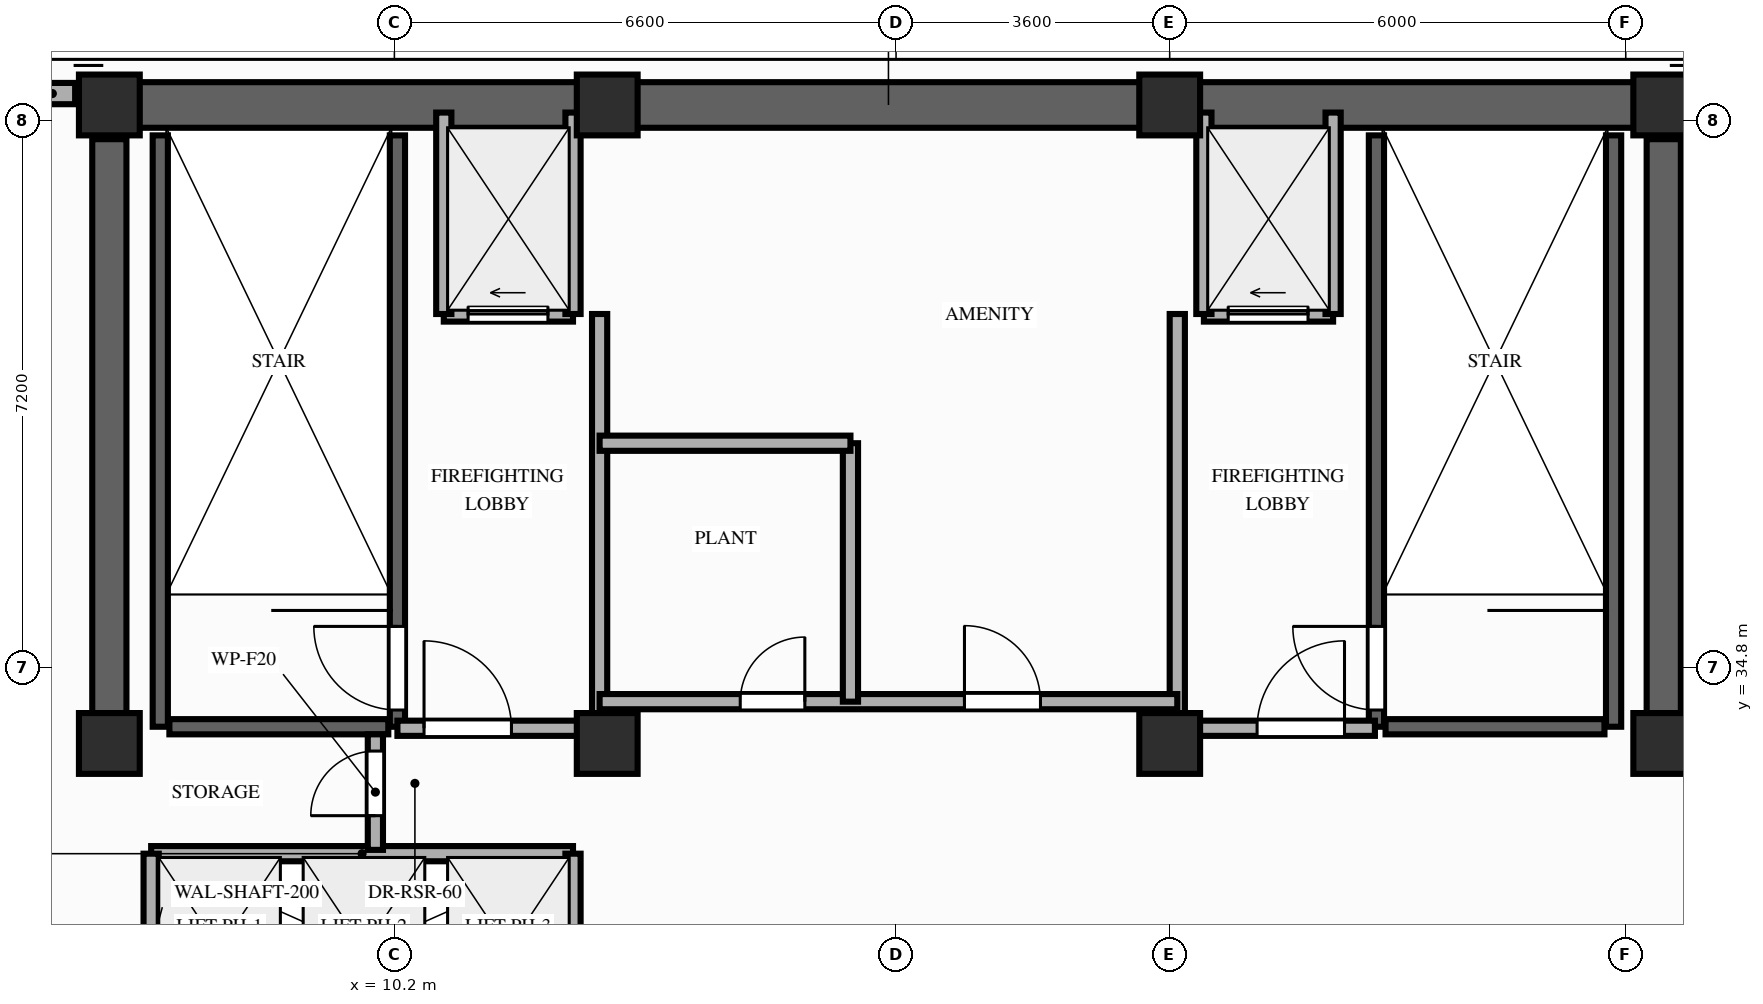
"""IFC4 building model, lengths in metres.
Left out: names, types, materials, properties, quantities, classifications, styles, units other than length and angle.
Written with IfcOpenShell. Run it as: python <this file> out.ifc"""

import sys

from ifc_helpers import new_model, si_unit, direction, frame, frame_2d, origin, origin_2d, place, context, subcontext, project, spatial, rectangle, extrude, element, fill, save


model = new_model("IFC4")
c1 = context("Model", 3, precision=1e-05, world=origin(), true_north=direction((0.0, 1.0)))
c2 = subcontext(c1, "Body", "Model", "MODEL_VIEW")
j1 = project(units=[si_unit("LENGTHUNIT", "METRE"), si_unit("PLANEANGLEUNIT", "RADIAN")], contexts=[c1])
p1 = place(None, origin())
s1 = spatial("IfcSite", under=j1, at=p1, CompositionType="ELEMENT")
p2 = place(p1, origin())
s2 = spatial("IfcBuilding", under=s1, at=p2, CompositionType="ELEMENT")
p3 = place(p2, frame((0.0, 0.0, 250.4)))
s3 = spatial("IfcBuildingStorey", under=s2, at=p3, CompositionType="ELEMENT", Elevation=250.4)
for number, where, z_axis, x_axis in (
    (1, (6.45, 33.8, 0.0), (0.0, 0.0, 1.0), (1.0, 0.0, 0.0)),
    (2, (13.0, 33.8, 0.0), (0.0, 0.0, 1.0), (1.0, 0.0, 0.0)),
    (3, (20.4, 33.8, 0.0), (0.0, 0.0, 1.0), (1.0, 0.0, 0.0)),
    (4, (26.9, 33.8, 0.0), (0.0, 0.0, 1.0), (1.0, 0.0, 0.0)),
    (5, (6.45, 42.2, 0.0), (0.0, 0.0, 1.0), (1.0, 0.0, 0.0)),
    (6, (13.0, 42.2, 0.0), (0.0, 0.0, 1.0), (1.0, 0.0, 0.0)),
    (7, (20.4, 42.2, 0.0), (0.0, 0.0, 1.0), (1.0, 0.0, 0.0)),
    (8, (26.9, 42.2, 0.0), (0.0, 0.0, 1.0), (1.0, 0.0, 0.0)),
):
    element("IfcColumn", number, at=place(p3, frame(where, z_axis=z_axis, x_axis=x_axis)), inside=s3, PredefinedType="COLUMN", context=c2, shape_type="SweptSolid", body=[
        extrude(rectangle(XDim=0.8, YDim=0.8, at=origin_2d()), origin(), (0.0, 0.0, 1.0), 3.8),
    ])
p4 = place(p3, frame((6.0, 42.35, 0.0), z_axis=(0.0, 0.0, 1.0), x_axis=(-1.0, 0.0, 0.0)))
e9 = element("IfcWall", 9, at=p4, inside=s3, PredefinedType="STANDARD", context=c2, shape_type="SweptSolid", body=[
    extrude(rectangle(XDim=0.6, YDim=0.28, at=frame_2d((0.3, 0.0))), origin(), (0.0, 0.0, 1.0), 3.58),
])
p5 = place(p3, frame((6.45, 42.2, 0.0), z_axis=(0.0, 0.0, 1.0), x_axis=(1.0, 0.0, 0.0)))
e10 = element("IfcWall", 10, at=p5, inside=s3, PredefinedType="SHEAR", context=c2, shape_type="SweptSolid", body=[
    extrude(rectangle(XDim=20.45, YDim=0.6, at=frame_2d((10.225, 0.0))), origin(), (0.0, 0.0, 1.0), 3.58),
])
for number, where, z_axis, x_axis in (
    (11, (6.45, 33.8, 0.0), (0.0, 0.0, 1.0), (0.0, 1.0, 0.0)),
    (12, (26.9, 33.8, 0.0), (0.0, 0.0, 1.0), (0.0, 1.0, 0.0)),
):
    element("IfcWall", number, at=place(p3, frame(where, z_axis=z_axis, x_axis=x_axis)), inside=s3, PredefinedType="SHEAR", context=c2, shape_type="SweptSolid", body=[
        extrude(rectangle(XDim=7.95, YDim=0.45, at=frame_2d((3.975, 0.0))), origin(), (0.0, 0.0, 1.0), 3.58),
    ])
p6 = place(p3, frame((7.12, 34.02, 0.0), z_axis=(0.0, 0.0, 1.0), x_axis=(0.0, 1.0, 0.0)))
e13 = element("IfcWall", 13, at=p6, inside=s3, PredefinedType="SHEAR", context=c2, shape_type="SweptSolid", body=[
    extrude(rectangle(XDim=7.78, YDim=0.2, at=frame_2d((3.89, 0.0))), origin(), (0.0, 0.0, 1.0), 3.58),
])
p7 = place(p3, frame((10.24, 34.02, 0.0), z_axis=(0.0, 0.0, 1.0), x_axis=(0.0, 1.0, 0.0)))
e14 = element("IfcWall", 14, at=p7, inside=s3, PredefinedType="SHEAR", context=c2, shape_type="SweptSolid", body=[
    extrude(rectangle(XDim=7.78, YDim=0.2, at=frame_2d((3.89, 0.0))), origin(), (0.0, 0.0, 1.0), 3.58),
])
p8 = place(p7, frame((0.22, 0.0, 0.0)))
e15 = element("IfcOpeningElement", 15, at=p8, cuts=e14, PredefinedType="OPENING", context=c2, shape_type="SweptSolid", body=[
    extrude(rectangle(XDim=1.1, YDim=2.15, at=frame_2d((0.55, 1.075))), frame((0.0, 0.11, 0.0), z_axis=(0.0, -1.0, 0.0), x_axis=(1.0, 0.0, 0.0)), (0.0, 0.0, 1.0), 0.22),
])
p9 = place(p3, frame((7.24, 34.02, 0.0), z_axis=(0.0, 0.0, 1.0), x_axis=(1.0, 0.0, 0.0)))
e16 = element("IfcWall", 16, at=p9, inside=s3, PredefinedType="SHEAR", context=c2, shape_type="SweptSolid", body=[
    extrude(rectangle(XDim=2.88, YDim=0.2, at=frame_2d((1.44, 0.0))), origin(), (0.0, 0.0, 1.0), 3.58),
])
p10 = place(p3, frame((23.12, 34.02, 0.0), z_axis=(0.0, 0.0, 1.0), x_axis=(0.0, 1.0, 0.0)))
e17 = element("IfcWall", 17, at=p10, inside=s3, PredefinedType="SHEAR", context=c2, shape_type="SweptSolid", body=[
    extrude(rectangle(XDim=7.78, YDim=0.2, at=frame_2d((3.89, 0.0))), origin(), (0.0, 0.0, 1.0), 3.58),
])
p11 = place(p10, frame((0.22, 0.0, 0.0)))
e18 = element("IfcOpeningElement", 18, at=p11, cuts=e17, PredefinedType="OPENING", context=c2, shape_type="SweptSolid", body=[
    extrude(rectangle(XDim=1.1, YDim=2.15, at=frame_2d((0.55, 1.075))), frame((0.0, 0.11, 0.0), z_axis=(0.0, -1.0, 0.0), x_axis=(1.0, 0.0, 0.0)), (0.0, 0.0, 1.0), 0.22),
])
p12 = place(p3, frame((26.24, 34.02, 0.0), z_axis=(0.0, 0.0, 1.0), x_axis=(0.0, 1.0, 0.0)))
e19 = element("IfcWall", 19, at=p12, inside=s3, PredefinedType="SHEAR", context=c2, shape_type="SweptSolid", body=[
    extrude(rectangle(XDim=7.78, YDim=0.2, at=frame_2d((3.89, 0.0))), origin(), (0.0, 0.0, 1.0), 3.58),
])
p13 = place(p3, frame((23.24, 34.02, 0.0), z_axis=(0.0, 0.0, 1.0), x_axis=(1.0, 0.0, 0.0)))
e20 = element("IfcWall", 20, at=p13, inside=s3, PredefinedType="SHEAR", context=c2, shape_type="SweptSolid", body=[
    extrude(rectangle(XDim=2.88, YDim=0.2, at=frame_2d((1.44, 0.0))), origin(), (0.0, 0.0, 1.0), 3.58),
])
p14 = place(p3, frame((7.0, 32.35, 0.0), z_axis=(0.0, 0.0, 1.0), x_axis=(1.0, 0.0, 0.0)))
e21 = element("IfcWall", 21, at=p14, inside=s3, PredefinedType="MOVABLE", context=c2, shape_type="SweptSolid", body=[
    extrude(rectangle(XDim=5.55, YDim=0.2, at=frame_2d((2.775, 0.0))), origin(), (0.0, 0.0, 1.0), 3.58),
])
for number, where, z_axis, x_axis in (
    (22, (7.0, 29.85, 0.0), (0.0, 0.0, 1.0), (0.0, 1.0, 0.0)),
    (23, (12.55, 29.85, 0.0), (0.0, 0.0, 1.0), (0.0, 1.0, 0.0)),
):
    element("IfcWall", number, at=place(p3, frame(where, z_axis=z_axis, x_axis=x_axis)), inside=s3, PredefinedType="MOVABLE", context=c2, shape_type="SweptSolid", body=[
        extrude(rectangle(XDim=2.5, YDim=0.2, at=frame_2d((1.25, 0.0))), origin(), (0.0, 0.0, 1.0), 3.58),
    ])
p15 = place(p3, frame((10.85, 39.45, 0.0), z_axis=(0.0, 0.0, 1.0), x_axis=(1.0, 0.0, 0.0)))
e24 = element("IfcWall", 24, at=p15, inside=s3, PredefinedType="MOVABLE", context=c2, shape_type="SweptSolid", body=[
    extrude(rectangle(XDim=1.7, YDim=0.2, at=frame_2d((0.85, 0.0))), origin(), (0.0, 0.0, 1.0), 3.58),
])
p16 = place(p15, frame((0.32, 0.0, 0.0)))
e25 = element("IfcOpeningElement", 25, at=p16, cuts=e24, PredefinedType="OPENING", context=c2, shape_type="SweptSolid", body=[
    extrude(rectangle(XDim=1.05, YDim=2.15, at=frame_2d((0.525, 1.075))), frame((0.0, 0.11, 0.0), z_axis=(0.0, -1.0, 0.0), x_axis=(1.0, 0.0, 0.0)), (0.0, 0.0, 1.0), 0.22),
])
p17 = place(p3, frame((20.85, 39.45, 0.0), z_axis=(0.0, 0.0, 1.0), x_axis=(1.0, 0.0, 0.0)))
e26 = element("IfcWall", 26, at=p17, inside=s3, PredefinedType="MOVABLE", context=c2, shape_type="SweptSolid", body=[
    extrude(rectangle(XDim=1.7, YDim=0.2, at=frame_2d((0.85, 0.0))), origin(), (0.0, 0.0, 1.0), 3.58),
])
p18 = place(p17, frame((0.32, 0.0, 0.0)))
e27 = element("IfcOpeningElement", 27, at=p18, cuts=e26, PredefinedType="OPENING", context=c2, shape_type="SweptSolid", body=[
    extrude(rectangle(XDim=1.05, YDim=2.15, at=frame_2d((0.525, 1.075))), frame((0.0, 0.11, 0.0), z_axis=(0.0, -1.0, 0.0), x_axis=(1.0, 0.0, 0.0)), (0.0, 0.0, 1.0), 0.22),
])
for number, where, z_axis, x_axis in (
    (28, (10.85, 39.45, 0.0), (0.0, 0.0, 1.0), (0.0, 1.0, 0.0)),
    (29, (12.55, 39.45, 0.0), (0.0, 0.0, 1.0), (0.0, 1.0, 0.0)),
):
    element("IfcWall", number, at=place(p3, frame(where, z_axis=z_axis, x_axis=x_axis)), inside=s3, PredefinedType="MOVABLE", context=c2, shape_type="SweptSolid", body=[
        extrude(rectangle(XDim=2.65, YDim=0.2, at=frame_2d((1.325, 0.0))), origin(), (0.0, 0.0, 1.0), 3.58),
    ])
p19 = place(p3, frame((12.9, 34.0, 0.0), z_axis=(0.0, 0.0, 1.0), x_axis=(0.0, 1.0, 0.0)))
e30 = element("IfcWall", 30, at=p19, inside=s3, PredefinedType="PARTITIONING", context=c2, shape_type="SweptSolid", body=[
    extrude(rectangle(XDim=5.45, YDim=0.2, at=frame_2d((2.725, 0.0))), origin(), (0.0, 0.0, 1.0), 3.58),
])
p20 = place(p3, frame((10.24, 34.0, 0.0), z_axis=(0.0, 0.0, 1.0), x_axis=(1.0, 0.0, 0.0)))
e31 = element("IfcWall", 31, at=p20, inside=s3, PredefinedType="PARTITIONING", context=c2, shape_type="SweptSolid", body=[
    extrude(rectangle(XDim=2.66, YDim=0.2, at=frame_2d((1.33, 0.0))), origin(), (0.0, 0.0, 1.0), 3.58),
])
p21 = place(p20, frame((0.35, 0.0, 0.0)))
e32 = element("IfcOpeningElement", 32, at=p21, cuts=e31, PredefinedType="OPENING", context=c2, shape_type="SweptSolid", body=[
    extrude(rectangle(XDim=1.15, YDim=2.15, at=frame_2d((0.575, 1.075))), frame((0.0, 0.11, 0.0), z_axis=(0.0, -1.0, 0.0), x_axis=(1.0, 0.0, 0.0)), (0.0, 0.0, 1.0), 0.22),
])
for number, where, z_axis, x_axis in (
    (33, (20.85, 39.45, 0.0), (0.0, 0.0, 1.0), (0.0, 1.0, 0.0)),
    (34, (22.55, 39.45, 0.0), (0.0, 0.0, 1.0), (0.0, 1.0, 0.0)),
):
    element("IfcWall", number, at=place(p3, frame(where, z_axis=z_axis, x_axis=x_axis)), inside=s3, PredefinedType="MOVABLE", context=c2, shape_type="SweptSolid", body=[
        extrude(rectangle(XDim=2.65, YDim=0.2, at=frame_2d((1.325, 0.0))), origin(), (0.0, 0.0, 1.0), 3.58),
    ])
p22 = place(p3, frame((20.5, 34.0, 0.0), z_axis=(0.0, 0.0, 1.0), x_axis=(0.0, 1.0, 0.0)))
e35 = element("IfcWall", 35, at=p22, inside=s3, PredefinedType="PARTITIONING", context=c2, shape_type="SweptSolid", body=[
    extrude(rectangle(XDim=5.45, YDim=0.2, at=frame_2d((2.725, 0.0))), origin(), (0.0, 0.0, 1.0), 3.58),
])
p23 = place(p3, frame((20.5, 34.0, 0.0), z_axis=(0.0, 0.0, 1.0), x_axis=(1.0, 0.0, 0.0)))
e36 = element("IfcWall", 36, at=p23, inside=s3, PredefinedType="PARTITIONING", context=c2, shape_type="SweptSolid", body=[
    extrude(rectangle(XDim=2.6, YDim=0.2, at=frame_2d((1.3, 0.0))), origin(), (0.0, 0.0, 1.0), 3.58),
])
p24 = place(p23, frame((1.05, 0.0, 0.0)))
e37 = element("IfcOpeningElement", 37, at=p24, cuts=e36, PredefinedType="OPENING", context=c2, shape_type="SweptSolid", body=[
    extrude(rectangle(XDim=1.15, YDim=2.15, at=frame_2d((0.575, 1.075))), frame((0.0, 0.11, 0.0), z_axis=(0.0, -1.0, 0.0), x_axis=(1.0, 0.0, 0.0)), (0.0, 0.0, 1.0), 0.22),
])
p25 = place(p3, frame((9.95, 32.4, 0.0), z_axis=(0.0, 0.0, 1.0), x_axis=(0.0, 1.0, 0.0)))
e38 = element("IfcWall", 38, at=p25, inside=s3, PredefinedType="PARTITIONING", context=c2, shape_type="SweptSolid", body=[
    extrude(rectangle(XDim=1.52, YDim=0.2, at=frame_2d((0.76, 0.0))), origin(), (0.0, 0.0, 1.0), 3.58),
])
p26 = place(p25, frame((0.45, 0.0, 0.0)))
e39 = element("IfcOpeningElement", 39, at=p26, cuts=e38, PredefinedType="OPENING", context=c2, shape_type="SweptSolid", body=[
    extrude(rectangle(XDim=0.85, YDim=2.05, at=frame_2d((0.425, 1.025))), frame((0.0, 0.11, 0.0), z_axis=(0.0, -1.0, 0.0), x_axis=(1.0, 0.0, 0.0)), (0.0, 0.0, 1.0), 0.22),
])
p27 = place(p3, frame((12.9, 34.35, 0.0), z_axis=(0.0, 0.0, 1.0), x_axis=(1.0, 0.0, 0.0)))
e40 = element("IfcWall", 40, at=p27, inside=s3, PredefinedType="PARTITIONING", context=c2, shape_type="SweptSolid", body=[
    extrude(rectangle(XDim=7.6, YDim=0.2, at=frame_2d((3.8, 0.0))), origin(), (0.0, 0.0, 1.0), 3.58),
])
p28 = place(p27, frame((1.85, 0.0, 0.0)))
e41 = element("IfcOpeningElement", 41, at=p28, cuts=e40, PredefinedType="OPENING", context=c2, shape_type="SweptSolid", body=[
    extrude(rectangle(XDim=0.85, YDim=2.05, at=frame_2d((0.425, 1.025))), frame((0.0, 0.11, 0.0), z_axis=(0.0, -1.0, 0.0), x_axis=(1.0, 0.0, 0.0)), (0.0, 0.0, 1.0), 0.22),
])
p29 = place(p27, frame((4.8, 0.0, 0.0)))
e42 = element("IfcOpeningElement", 42, at=p29, cuts=e40, PredefinedType="OPENING", context=c2, shape_type="SweptSolid", body=[
    extrude(rectangle(XDim=1.0, YDim=2.15, at=frame_2d((0.5, 1.075))), frame((0.0, 0.11, 0.0), z_axis=(0.0, -1.0, 0.0), x_axis=(1.0, 0.0, 0.0)), (0.0, 0.0, 1.0), 0.22),
])
p30 = place(p3, frame((16.2, 34.35, 0.0), z_axis=(0.0, 0.0, 1.0), x_axis=(0.0, 1.0, 0.0)))
e43 = element("IfcWall", 43, at=p30, inside=s3, PredefinedType="PARTITIONING", context=c2, shape_type="SweptSolid", body=[
    extrude(rectangle(XDim=3.4, YDim=0.2, at=frame_2d((1.7, 0.0))), origin(), (0.0, 0.0, 1.0), 3.58),
])
p31 = place(p3, frame((12.9, 37.75, 0.0), z_axis=(0.0, 0.0, 1.0), x_axis=(1.0, 0.0, 0.0)))
e44 = element("IfcWall", 44, at=p31, inside=s3, PredefinedType="PARTITIONING", context=c2, shape_type="SweptSolid", body=[
    extrude(rectangle(XDim=3.3, YDim=0.2, at=frame_2d((1.65, 0.0))), origin(), (0.0, 0.0, 1.0), 3.58),
])
p32 = place(p8, origin())
e45 = element("IfcDoor", 45, at=p32, inside=s3, OperationType="SINGLE_SWING_RIGHT", PredefinedType="DOOR", context=c2, shape_type="SweptSolid", body=[
    extrude(rectangle(XDim=1.1, YDim=2.15, at=frame_2d((0.55, 1.075))), frame((0.0, 0.025, 0.0), z_axis=(0.0, -1.0, 0.0), x_axis=(1.0, 0.0, 0.0)), (0.0, 0.0, 1.0), 0.05),
])
fill(e15, e45)
p33 = place(p11, origin())
e46 = element("IfcDoor", 46, at=p33, inside=s3, OperationType="SINGLE_SWING_RIGHT", PredefinedType="DOOR", context=c2, shape_type="SweptSolid", body=[
    extrude(rectangle(XDim=1.1, YDim=2.15, at=frame_2d((0.55, 1.075))), frame((0.0, 0.025, 0.0), z_axis=(0.0, -1.0, 0.0), x_axis=(1.0, 0.0, 0.0)), (0.0, 0.0, 1.0), 0.05),
])
fill(e18, e46)
p34 = place(p16, origin())
e47 = element("IfcDoor", 47, at=p34, inside=s3, OperationType="SLIDING_TO_LEFT", PredefinedType="DOOR", context=c2, shape_type="SweptSolid", body=[
    extrude(rectangle(XDim=1.05, YDim=2.15, at=frame_2d((0.525, 1.075))), frame((0.0, 0.025, 0.0), z_axis=(0.0, -1.0, 0.0), x_axis=(1.0, 0.0, 0.0)), (0.0, 0.0, 1.0), 0.05),
])
fill(e25, e47)
p35 = place(p18, origin())
e48 = element("IfcDoor", 48, at=p35, inside=s3, OperationType="SLIDING_TO_LEFT", PredefinedType="DOOR", context=c2, shape_type="SweptSolid", body=[
    extrude(rectangle(XDim=1.05, YDim=2.15, at=frame_2d((0.525, 1.075))), frame((0.0, 0.025, 0.0), z_axis=(0.0, -1.0, 0.0), x_axis=(1.0, 0.0, 0.0)), (0.0, 0.0, 1.0), 0.05),
])
fill(e27, e48)
p36 = place(p21, origin())
e49 = element("IfcDoor", 49, at=p36, inside=s3, OperationType="SINGLE_SWING_LEFT", PredefinedType="DOOR", context=c2, shape_type="SweptSolid", body=[
    extrude(rectangle(XDim=1.15, YDim=2.15, at=frame_2d((0.575, 1.075))), frame((0.0, 0.025, 0.0), z_axis=(0.0, -1.0, 0.0), x_axis=(1.0, 0.0, 0.0)), (0.0, 0.0, 1.0), 0.05),
])
fill(e32, e49)
p37 = place(p24, origin())
e50 = element("IfcDoor", 50, at=p37, inside=s3, OperationType="SINGLE_SWING_RIGHT", PredefinedType="DOOR", context=c2, shape_type="SweptSolid", body=[
    extrude(rectangle(XDim=1.15, YDim=2.15, at=frame_2d((0.575, 1.075))), frame((0.0, 0.025, 0.0), z_axis=(0.0, -1.0, 0.0), x_axis=(1.0, 0.0, 0.0)), (0.0, 0.0, 1.0), 0.05),
])
fill(e37, e50)
p38 = place(p26, origin())
e51 = element("IfcDoor", 51, at=p38, inside=s3, OperationType="SINGLE_SWING_LEFT", PredefinedType="DOOR", context=c2, shape_type="SweptSolid", body=[
    extrude(rectangle(XDim=0.85, YDim=2.05, at=frame_2d((0.425, 1.025))), frame((0.0, 0.025, 0.0), z_axis=(0.0, -1.0, 0.0), x_axis=(1.0, 0.0, 0.0)), (0.0, 0.0, 1.0), 0.05),
])
fill(e39, e51)
p39 = place(p28, origin())
e52 = element("IfcDoor", 52, at=p39, inside=s3, OperationType="SINGLE_SWING_RIGHT", PredefinedType="DOOR", context=c2, shape_type="SweptSolid", body=[
    extrude(rectangle(XDim=0.85, YDim=2.05, at=frame_2d((0.425, 1.025))), frame((0.0, 0.025, 0.0), z_axis=(0.0, -1.0, 0.0), x_axis=(1.0, 0.0, 0.0)), (0.0, 0.0, 1.0), 0.05),
])
fill(e41, e52)
p40 = place(p29, origin())
e53 = element("IfcDoor", 53, at=p40, inside=s3, OperationType="SINGLE_SWING_LEFT", PredefinedType="DOOR", context=c2, shape_type="SweptSolid", body=[
    extrude(rectangle(XDim=1.0, YDim=2.15, at=frame_2d((0.5, 1.075))), frame((0.0, 0.025, 0.0), z_axis=(0.0, -1.0, 0.0), x_axis=(1.0, 0.0, 0.0)), (0.0, 0.0, 1.0), 0.05),
])
fill(e42, e53)
save(model, sys.argv[1])
